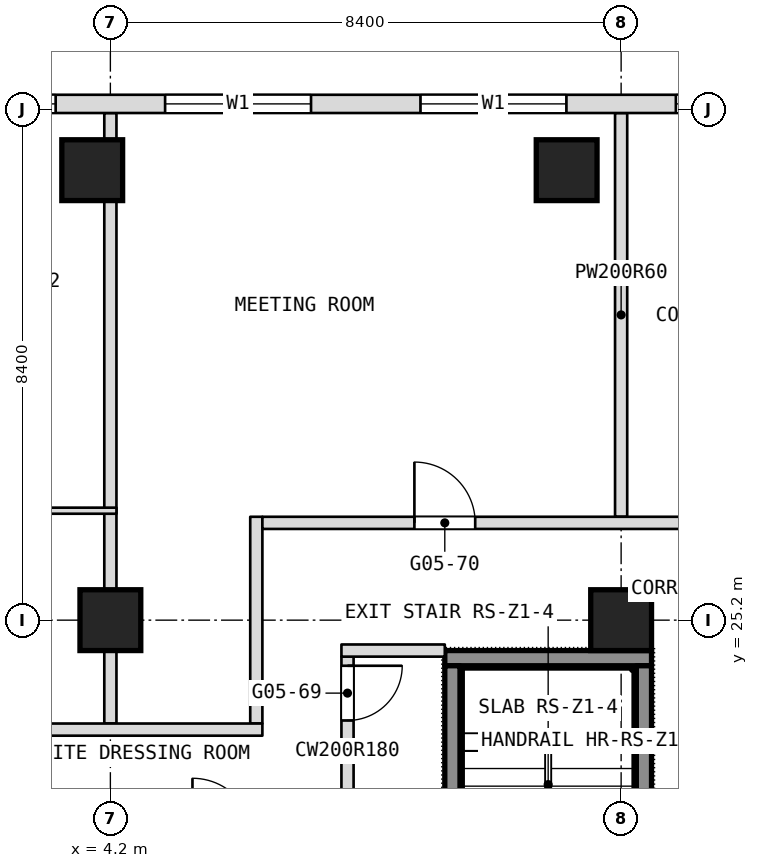
"""IFC4 building model, lengths in metres.
Left out: names, types, materials, properties, quantities, classifications, styles, units other than length and angle.
Written with IfcOpenShell. Run it as: python <this file> out.ifc"""

import sys

from ifc_helpers import new_model, si_unit, direction, frame, frame_2d, origin, origin_2d, place, context, subcontext, project, spatial, rectangle, extrude, element, fill, save


model = new_model("IFC4")
c1 = context("Model", 3, precision=1e-05, world=origin(), true_north=direction((0.0, 1.0)))
c2 = subcontext(c1, "Body", "Model", "MODEL_VIEW")
j1 = project(units=[si_unit("LENGTHUNIT", "METRE"), si_unit("PLANEANGLEUNIT", "RADIAN")], contexts=[c1])
p1 = place(None, origin())
s1 = spatial("IfcSite", under=j1, at=p1, CompositionType="ELEMENT")
p2 = place(p1, origin())
s2 = spatial("IfcBuilding", under=s1, at=p2, CompositionType="ELEMENT")
p3 = place(p2, frame((0.0, 0.0, 68.9)))
s3 = spatial("IfcBuildingStorey", under=s2, at=p3, CompositionType="ELEMENT", Elevation=68.9)
for number, where, z_axis, x_axis in (
    (1, (4.2, 25.2, 0.0), (0.0, 0.0, 1.0), (1.0, 0.0, 0.0)),
    (2, (12.6, 25.2, 0.0), (0.0, 0.0, 1.0), (1.0, 0.0, 0.0)),
    (3, (3.901, 32.6, 0.0), (0.0, 0.0, 1.0), (1.0, 0.0, 0.0)),
    (4, (11.704, 32.6, 0.0), (0.0, 0.0, 1.0), (1.0, 0.0, 0.0)),
):
    element("IfcColumn", number, at=place(p3, frame(where, z_axis=z_axis, x_axis=x_axis)), inside=s3, PredefinedType="COLUMN", context=c2, shape_type="SweptSolid", body=[
        extrude(rectangle(XDim=1.0, YDim=1.0, at=origin_2d()), origin(), (0.0, 0.0, 1.0), 3.6),
    ])
p4 = place(p3, frame((12.6, 26.9, 0.0), z_axis=(0.0, 0.0, 1.0), x_axis=(0.0, 1.0, 0.0)))
e5 = element("IfcWall", 5, at=p4, inside=s3, PredefinedType="PARTITIONING", context=c2, shape_type="SweptSolid", body=[
    extrude(rectangle(XDim=6.64, YDim=0.2, at=frame_2d((3.32, 0.0))), origin(), (0.0, 0.0, 1.0), 3.34),
])
p5 = place(p3, frame((8.1, 21.5, 0.0), z_axis=(0.0, 0.0, 1.0), x_axis=(0.0, 1.0, 0.0)))
e6 = element("IfcWall", 6, at=p5, inside=s3, PredefinedType="PARTITIONING", context=c2, shape_type="SweptSolid", body=[
    extrude(rectangle(XDim=3.1, YDim=0.2, at=frame_2d((1.55, 0.0))), origin(), (0.0, 0.0, 1.0), 3.34),
])
p6 = place(p5, frame((2.05, 0.0, 0.0)))
e7 = element("IfcOpeningElement", 7, at=p6, cuts=e6, PredefinedType="OPENING", context=c2, shape_type="SweptSolid", body=[
    extrude(rectangle(XDim=0.9, YDim=2.1, at=frame_2d((0.45, 1.05))), frame((0.0, 0.1, 0.0), z_axis=(0.0, -1.0, 0.0), x_axis=(1.0, 0.0, 0.0)), (0.0, 0.0, 1.0), 0.2),
])
p7 = place(p3, frame((6.6, 23.5, 0.0), z_axis=(0.0, 0.0, 1.0), x_axis=(0.0, 1.0, 0.0)))
e8 = element("IfcWall", 8, at=p7, inside=s3, PredefinedType="PARTITIONING", context=c2, shape_type="SweptSolid", body=[
    extrude(rectangle(XDim=3.4, YDim=0.2, at=frame_2d((1.7, 0.0))), origin(), (0.0, 0.0, 1.0), 3.34),
])
p8 = place(p3, frame((4.2, 23.5, 0.0), z_axis=(0.0, 0.0, 1.0), x_axis=(0.0, 1.0, 0.0)))
e9 = element("IfcWall", 9, at=p8, inside=s3, PredefinedType="PARTITIONING", context=c2, shape_type="SweptSolid", body=[
    extrude(rectangle(XDim=10.04, YDim=0.2, at=frame_2d((5.02, 0.0))), origin(), (0.0, 0.0, 1.0), 3.34),
])
p9 = place(p3, frame((-16.7, 23.4, 0.0), z_axis=(0.0, 0.0, 1.0), x_axis=(1.0, 0.0, 0.0)))
e10 = element("IfcWall", 10, at=p9, inside=s3, PredefinedType="PARTITIONING", context=c2, shape_type="SweptSolid", body=[
    extrude(rectangle(XDim=23.4, YDim=0.2, at=frame_2d((11.7, 0.0))), origin(), (0.0, 0.0, 1.0), 3.34),
])
p10 = place(p9, frame((2.4, 0.0, 0.0)))
e11 = element("IfcOpeningElement", 11, at=p10, cuts=e10, PredefinedType="OPENING", context=c2, shape_type="SweptSolid", body=[
    extrude(rectangle(XDim=0.9, YDim=2.1, at=frame_2d((0.45, 1.05))), frame((0.0, 0.1, 0.0), z_axis=(0.0, -1.0, 0.0), x_axis=(1.0, 0.0, 0.0)), (0.0, 0.0, 1.0), 0.2),
])
p11 = place(p9, frame((5.65, 0.0, 0.0)))
e12 = element("IfcOpeningElement", 12, at=p11, cuts=e10, PredefinedType="OPENING", context=c2, shape_type="SweptSolid", body=[
    extrude(rectangle(XDim=1.1, YDim=2.1, at=frame_2d((0.55, 1.05))), frame((0.0, 0.1, 0.0), z_axis=(0.0, -1.0, 0.0), x_axis=(1.0, 0.0, 0.0)), (0.0, 0.0, 1.0), 0.2),
])
p12 = place(p9, frame((16.2, 0.0, 0.0)))
e13 = element("IfcOpeningElement", 13, at=p12, cuts=e10, PredefinedType="OPENING", context=c2, shape_type="SweptSolid", body=[
    extrude(rectangle(XDim=1.1, YDim=2.1, at=frame_2d((0.55, 1.05))), frame((0.0, 0.1, 0.0), z_axis=(0.0, -1.0, 0.0), x_axis=(1.0, 0.0, 0.0)), (0.0, 0.0, 1.0), 0.2),
])
p13 = place(p3, frame((8.0, 24.7, 0.0), z_axis=(0.0, 0.0, 1.0), x_axis=(1.0, 0.0, 0.0)))
e14 = element("IfcWall", 14, at=p13, inside=s3, PredefinedType="PARTITIONING", context=c2, shape_type="SweptSolid", body=[
    extrude(rectangle(XDim=1.7, YDim=0.2, at=frame_2d((0.85, 0.0))), origin(), (0.0, 0.0, 1.0), 3.34),
])
p14 = place(p3, frame((6.7, 26.8, 0.0), z_axis=(0.0, 0.0, 1.0), x_axis=(1.0, 0.0, 0.0)))
e15 = element("IfcWall", 15, at=p14, inside=s3, PredefinedType="PARTITIONING", context=c2, shape_type="SweptSolid", body=[
    extrude(rectangle(XDim=8.0, YDim=0.2, at=frame_2d((4.0, 0.0))), origin(), (0.0, 0.0, 1.0), 3.34),
])
p15 = place(p14, frame((2.5, 0.0, 0.0)))
e16 = element("IfcOpeningElement", 16, at=p15, cuts=e15, PredefinedType="OPENING", context=c2, shape_type="SweptSolid", body=[
    extrude(rectangle(XDim=1.0, YDim=2.1, at=frame_2d((0.5, 1.05))), frame((0.0, 0.1, 0.0), z_axis=(0.0, -1.0, 0.0), x_axis=(1.0, 0.0, 0.0)), (0.0, 0.0, 1.0), 0.2),
])
p16 = place(p3, frame((1.75, 27.0, 0.0), z_axis=(0.0, 0.0, 1.0), x_axis=(1.0, 0.0, 0.0)))
e17 = element("IfcWall", 17, at=p16, inside=s3, PredefinedType="PARTITIONING", context=c2, shape_type="SweptSolid", body=[
    extrude(rectangle(XDim=2.55, YDim=0.1, at=frame_2d((1.275, 0.0))), origin(), (0.0, 0.0, 1.0), 3.34),
])
p17 = place(p16, frame((0.15, 0.0, 0.0)))
e18 = element("IfcOpeningElement", 18, at=p17, cuts=e17, PredefinedType="OPENING", context=c2, shape_type="SweptSolid", body=[
    extrude(rectangle(XDim=0.9, YDim=2.1, at=frame_2d((0.45, 1.05))), frame((0.0, 0.05, 0.0), z_axis=(0.0, -1.0, 0.0), x_axis=(1.0, 0.0, 0.0)), (0.0, 0.0, 1.0), 0.1),
])
p18 = place(p3, frame((23.406, 33.69, 0.0), z_axis=(0.0, 0.0, 1.0), x_axis=(-1.0, 0.0, 0.0)))
e19 = element("IfcWall", 19, at=p18, inside=s3, PredefinedType="NOTDEFINED", context=c2, shape_type="SweptSolid", body=[
    extrude(rectangle(XDim=46.812, YDim=0.3, at=frame_2d((23.406, 0.0))), origin(), (0.0, 0.0, 1.0), 3.6),
])
p19 = place(p18, frame((2.186, 0.0, 0.9)))
e20 = element("IfcOpeningElement", 20, at=p19, cuts=e19, PredefinedType="OPENING", context=c2, shape_type="SweptSolid", body=[
    extrude(rectangle(XDim=2.4, YDim=2.1, at=frame_2d((1.2, 1.05))), frame((0.0, 0.15, 0.0), z_axis=(0.0, -1.0, 0.0), x_axis=(1.0, 0.0, 0.0)), (0.0, 0.0, 1.0), 0.3),
])
p20 = place(p18, frame((7.506, 0.0, 0.9)))
e21 = element("IfcOpeningElement", 21, at=p20, cuts=e19, PredefinedType="OPENING", context=c2, shape_type="SweptSolid", body=[
    extrude(rectangle(XDim=2.4, YDim=2.1, at=frame_2d((1.2, 1.05))), frame((0.0, 0.15, 0.0), z_axis=(0.0, -1.0, 0.0), x_axis=(1.0, 0.0, 0.0)), (0.0, 0.0, 1.0), 0.3),
])
p21 = place(p18, frame((11.706, 0.0, 0.9)))
e22 = element("IfcOpeningElement", 22, at=p21, cuts=e19, PredefinedType="OPENING", context=c2, shape_type="SweptSolid", body=[
    extrude(rectangle(XDim=2.4, YDim=2.1, at=frame_2d((1.2, 1.05))), frame((0.0, 0.15, 0.0), z_axis=(0.0, -1.0, 0.0), x_axis=(1.0, 0.0, 0.0)), (0.0, 0.0, 1.0), 0.3),
])
p22 = place(p18, frame((15.906, 0.0, 0.9)))
e23 = element("IfcOpeningElement", 23, at=p22, cuts=e19, PredefinedType="OPENING", context=c2, shape_type="SweptSolid", body=[
    extrude(rectangle(XDim=2.4, YDim=2.1, at=frame_2d((1.2, 1.05))), frame((0.0, 0.15, 0.0), z_axis=(0.0, -1.0, 0.0), x_axis=(1.0, 0.0, 0.0)), (0.0, 0.0, 1.0), 0.3),
])
p23 = place(p18, frame((20.106, 0.0, 0.9)))
e24 = element("IfcOpeningElement", 24, at=p23, cuts=e19, PredefinedType="OPENING", context=c2, shape_type="SweptSolid", body=[
    extrude(rectangle(XDim=2.4, YDim=2.1, at=frame_2d((1.2, 1.05))), frame((0.0, 0.15, 0.0), z_axis=(0.0, -1.0, 0.0), x_axis=(1.0, 0.0, 0.0)), (0.0, 0.0, 1.0), 0.3),
])
p24 = place(p18, frame((24.306, 0.0, 0.9)))
e25 = element("IfcOpeningElement", 25, at=p24, cuts=e19, PredefinedType="OPENING", context=c2, shape_type="SweptSolid", body=[
    extrude(rectangle(XDim=2.4, YDim=2.1, at=frame_2d((1.2, 1.05))), frame((0.0, 0.15, 0.0), z_axis=(0.0, -1.0, 0.0), x_axis=(1.0, 0.0, 0.0)), (0.0, 0.0, 1.0), 0.3),
])
p25 = place(p18, frame((28.506, 0.0, 0.9)))
e26 = element("IfcOpeningElement", 26, at=p25, cuts=e19, PredefinedType="OPENING", context=c2, shape_type="SweptSolid", body=[
    extrude(rectangle(XDim=2.4, YDim=2.1, at=frame_2d((1.2, 1.05))), frame((0.0, 0.15, 0.0), z_axis=(0.0, -1.0, 0.0), x_axis=(1.0, 0.0, 0.0)), (0.0, 0.0, 1.0), 0.3),
])
p26 = place(p18, frame((32.706, 0.0, 0.9)))
e27 = element("IfcOpeningElement", 27, at=p26, cuts=e19, PredefinedType="OPENING", context=c2, shape_type="SweptSolid", body=[
    extrude(rectangle(XDim=2.4, YDim=2.1, at=frame_2d((1.2, 1.05))), frame((0.0, 0.15, 0.0), z_axis=(0.0, -1.0, 0.0), x_axis=(1.0, 0.0, 0.0)), (0.0, 0.0, 1.0), 0.3),
])
p27 = place(p18, frame((36.906, 0.0, 0.9)))
e28 = element("IfcOpeningElement", 28, at=p27, cuts=e19, PredefinedType="OPENING", context=c2, shape_type="SweptSolid", body=[
    extrude(rectangle(XDim=2.4, YDim=2.1, at=frame_2d((1.2, 1.05))), frame((0.0, 0.15, 0.0), z_axis=(0.0, -1.0, 0.0), x_axis=(1.0, 0.0, 0.0)), (0.0, 0.0, 1.0), 0.3),
])
p28 = place(p18, frame((42.226, 0.0, 0.9)))
e29 = element("IfcOpeningElement", 29, at=p28, cuts=e19, PredefinedType="OPENING", context=c2, shape_type="SweptSolid", body=[
    extrude(rectangle(XDim=2.4, YDim=2.1, at=frame_2d((1.2, 1.05))), frame((0.0, 0.15, 0.0), z_axis=(0.0, -1.0, 0.0), x_axis=(1.0, 0.0, 0.0)), (0.0, 0.0, 1.0), 0.3),
])
p29 = place(p3, frame((9.7, 24.575, 0.1), z_axis=(0.0, 0.0, 1.0), x_axis=(1.0, 0.0, 0.0)))
e30 = element("IfcWall", 30, at=p29, inside=s3, PredefinedType="SHEAR", context=c2, shape_type="SweptSolid", body=[
    extrude(rectangle(XDim=3.4, YDim=0.25, at=frame_2d((1.7, 0.0))), origin(), (0.0, 0.0, 1.0), 3.6),
])
p30 = place(p3, frame((9.825, 18.75, 0.1), z_axis=(0.0, 0.0, 1.0), x_axis=(0.0, 1.0, 0.0)))
e31 = element("IfcWall", 31, at=p30, inside=s3, PredefinedType="SHEAR", context=c2, shape_type="SweptSolid", body=[
    extrude(rectangle(XDim=5.7, YDim=0.25, at=frame_2d((2.85, 0.0))), origin(), (0.0, 0.0, 1.0), 3.6),
])
p31 = place(p30, frame((0.2, 0.0, 0.0)))
e32 = element("IfcOpeningElement", 32, at=p31, cuts=e31, PredefinedType="OPENING", context=c2, shape_type="SweptSolid", body=[
    extrude(rectangle(XDim=1.0, YDim=2.1, at=frame_2d((0.5, 1.05))), frame((0.0, 0.125, 0.0), z_axis=(0.0, -1.0, 0.0), x_axis=(1.0, 0.0, 0.0)), (0.0, 0.0, 1.0), 0.25),
])
p32 = place(p3, frame((12.975, 18.75, 0.1), z_axis=(0.0, 0.0, 1.0), x_axis=(0.0, 1.0, 0.0)))
e33 = element("IfcWall", 33, at=p32, inside=s3, PredefinedType="SHEAR", context=c2, shape_type="SweptSolid", body=[
    extrude(rectangle(XDim=5.7, YDim=0.25, at=frame_2d((2.85, 0.0))), origin(), (0.0, 0.0, 1.0), 3.6),
])
p33 = place(p6, origin())
e34 = element("IfcDoor", 34, at=p33, inside=s3, OperationType="SINGLE_SWING_LEFT", PredefinedType="DOOR", context=c2, shape_type="SweptSolid", body=[
    extrude(rectangle(XDim=0.9, YDim=2.1, at=frame_2d((0.45, 1.05))), frame((0.0, 0.025, 0.0), z_axis=(0.0, -1.0, 0.0), x_axis=(1.0, 0.0, 0.0)), (0.0, 0.0, 1.0), 0.05),
])
fill(e7, e34)
p34 = place(p15, origin())
e35 = element("IfcDoor", 35, at=p34, inside=s3, OperationType="SINGLE_SWING_RIGHT", PredefinedType="DOOR", context=c2, shape_type="SweptSolid", body=[
    extrude(rectangle(XDim=1.0, YDim=2.1, at=frame_2d((0.5, 1.05))), frame((0.0, 0.025, 0.0), z_axis=(0.0, -1.0, 0.0), x_axis=(1.0, 0.0, 0.0)), (0.0, 0.0, 1.0), 0.05),
])
fill(e16, e35)
p35 = place(p20, origin())
e36 = element("IfcWindow", 36, at=p35, inside=s3, PartitioningType="SINGLE_PANEL", PredefinedType="WINDOW", context=c2, shape_type="SweptSolid", body=[
    extrude(rectangle(XDim=2.4, YDim=2.1, at=frame_2d((1.2, 1.05))), frame((0.0, 0.03, 0.0), z_axis=(0.0, -1.0, 0.0), x_axis=(1.0, 0.0, 0.0)), (0.0, 0.0, 1.0), 0.06),
])
fill(e21, e36)
p36 = place(p21, origin())
e37 = element("IfcWindow", 37, at=p36, inside=s3, PartitioningType="SINGLE_PANEL", PredefinedType="WINDOW", context=c2, shape_type="SweptSolid", body=[
    extrude(rectangle(XDim=2.4, YDim=2.1, at=frame_2d((1.2, 1.05))), frame((0.0, 0.03, 0.0), z_axis=(0.0, -1.0, 0.0), x_axis=(1.0, 0.0, 0.0)), (0.0, 0.0, 1.0), 0.06),
])
fill(e22, e37)
p37 = place(p22, origin())
e38 = element("IfcWindow", 38, at=p37, inside=s3, PartitioningType="SINGLE_PANEL", PredefinedType="WINDOW", context=c2, shape_type="SweptSolid", body=[
    extrude(rectangle(XDim=2.4, YDim=2.1, at=frame_2d((1.2, 1.05))), frame((0.0, 0.03, 0.0), z_axis=(0.0, -1.0, 0.0), x_axis=(1.0, 0.0, 0.0)), (0.0, 0.0, 1.0), 0.06),
])
fill(e23, e38)
p38 = place(p23, origin())
e39 = element("IfcWindow", 39, at=p38, inside=s3, PartitioningType="SINGLE_PANEL", PredefinedType="WINDOW", context=c2, shape_type="SweptSolid", body=[
    extrude(rectangle(XDim=2.4, YDim=2.1, at=frame_2d((1.2, 1.05))), frame((0.0, 0.03, 0.0), z_axis=(0.0, -1.0, 0.0), x_axis=(1.0, 0.0, 0.0)), (0.0, 0.0, 1.0), 0.06),
])
fill(e24, e39)
save(model, sys.argv[1])
